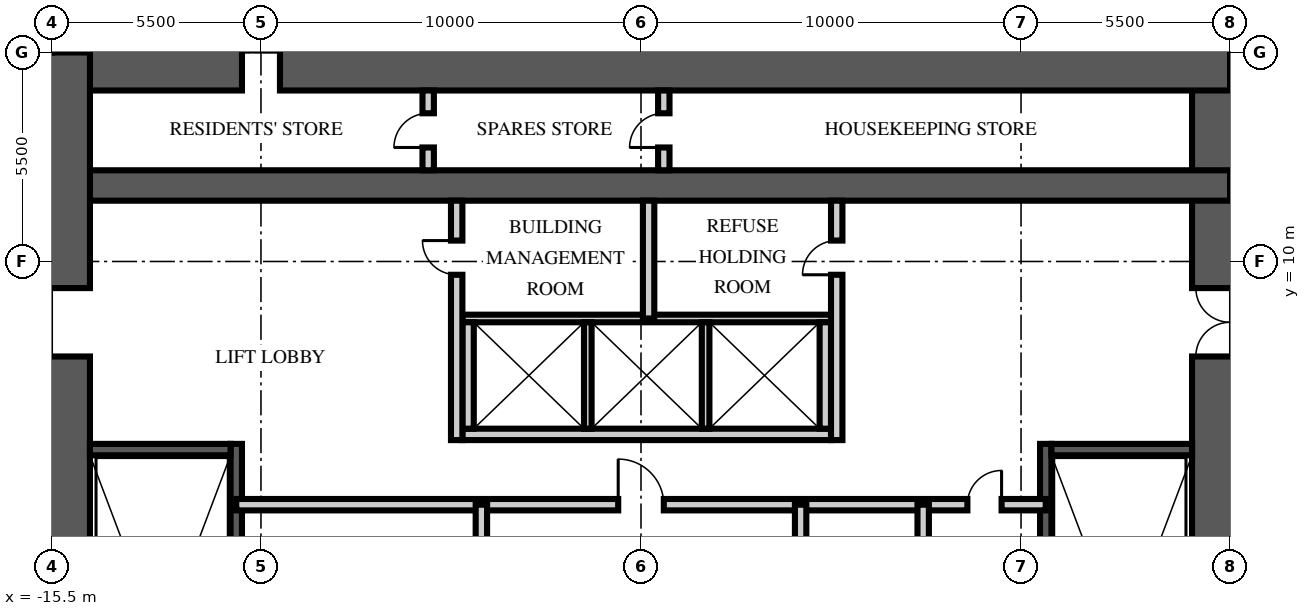
"""IFC4 building model, lengths in metres.
Left out: names, types, materials, properties, quantities, classifications, styles, units other than length and angle.
Written with IfcOpenShell. Run it as: python <this file> out.ifc"""

import sys

from ifc_helpers import new_model, si_unit, direction, frame, frame_2d, origin, place, context, subcontext, project, spatial, rectangle, extrude, element, fill, save


model = new_model("IFC4")
c1 = context("Model", 3, precision=1e-05, world=origin(), true_north=direction((0.0, 1.0)))
c2 = subcontext(c1, "Body", "Model", "MODEL_VIEW")
j1 = project(units=[si_unit("LENGTHUNIT", "METRE"), si_unit("PLANEANGLEUNIT", "RADIAN")], contexts=[c1])
p1 = place(None, origin())
s1 = spatial("IfcSite", under=j1, at=p1, CompositionType="ELEMENT")
p2 = place(p1, origin())
s2 = spatial("IfcBuilding", under=s1, at=p2, CompositionType="ELEMENT")
p3 = place(p2, frame((0.0, 0.0, 152.25)))
s3 = spatial("IfcBuildingStorey", under=s2, at=p3, CompositionType="ELEMENT", Elevation=152.25)
p4 = place(p3, frame((15.5, -15.5, -0.25), z_axis=(0.0, 0.0, 1.0), x_axis=(0.0, 1.0, 0.0)))
e1 = element("IfcWall", 1, at=p4, inside=s3, PredefinedType="SHEAR", context=c2, shape_type="SweptSolid", body=[
    extrude(rectangle(XDim=31.0, YDim=2.0, at=frame_2d((15.5, 0.0))), origin(), (0.0, 0.0, 1.0), 3.75),
])
p5 = place(p4, frame((6.5, 0.0, 0.25)))
e2 = element("IfcOpeningElement", 2, at=p5, cuts=e1, PredefinedType="OPENING", context=c2, shape_type="SweptSolid", body=[
    extrude(rectangle(XDim=1.2, YDim=2.1, at=frame_2d((0.6, 1.05))), frame((0.0, 1.01, 0.0), z_axis=(0.0, -1.0, 0.0), x_axis=(1.0, 0.0, 0.0)), (0.0, 0.0, 1.0), 2.02),
])
p6 = place(p4, frame((23.0, 0.0, 0.25)))
e3 = element("IfcOpeningElement", 3, at=p6, cuts=e1, PredefinedType="OPENING", context=c2, shape_type="SweptSolid", body=[
    extrude(rectangle(XDim=1.8, YDim=2.1, at=frame_2d((0.9, 1.05))), frame((0.0, 1.01, 0.0), z_axis=(0.0, -1.0, 0.0), x_axis=(1.0, 0.0, 0.0)), (0.0, 0.0, 1.0), 2.02),
])
p7 = place(p3, frame((-15.5, 15.5, -0.25), z_axis=(0.0, 0.0, 1.0), x_axis=(1.0, 0.0, 0.0)))
e4 = element("IfcWall", 4, at=p7, inside=s3, PredefinedType="SHEAR", context=c2, shape_type="SweptSolid", body=[
    extrude(rectangle(XDim=31.0, YDim=2.0, at=frame_2d((15.5, 0.0))), origin(), (0.0, 0.0, 1.0), 3.75),
])
p8 = place(p7, frame((5.0, 0.0, 0.25)))
e5 = element("IfcOpeningElement", 5, at=p8, cuts=e4, PredefinedType="OPENING", context=c2, shape_type="SweptSolid", body=[
    extrude(rectangle(XDim=1.0, YDim=2.1, at=frame_2d((0.5, 1.05))), frame((0.0, 1.01, 0.0), z_axis=(0.0, -1.0, 0.0), x_axis=(1.0, 0.0, 0.0)), (0.0, 0.0, 1.0), 2.02),
])
p9 = place(p3, frame((-15.5, 12.0, -0.25), z_axis=(0.0, 0.0, 1.0), x_axis=(1.0, 0.0, 0.0)))
e6 = element("IfcWall", 6, at=p9, inside=s3, PredefinedType="SHEAR", context=c2, shape_type="SweptSolid", body=[
    extrude(rectangle(XDim=31.0, YDim=0.8, at=frame_2d((15.5, 0.0))), origin(), (0.0, 0.0, 1.0), 3.75),
])
p10 = place(p3, frame((-15.5, -15.5, -0.25), z_axis=(0.0, 0.0, 1.0), x_axis=(0.0, 1.0, 0.0)))
e7 = element("IfcWall", 7, at=p10, inside=s3, PredefinedType="SHEAR", context=c2, shape_type="SweptSolid", body=[
    extrude(rectangle(XDim=31.0, YDim=2.0, at=frame_2d((15.5, 0.0))), origin(), (0.0, 0.0, 1.0), 3.75),
])
p11 = place(p10, frame((6.5, 0.0, 0.25)))
e8 = element("IfcOpeningElement", 8, at=p11, cuts=e7, PredefinedType="OPENING", context=c2, shape_type="SweptSolid", body=[
    extrude(rectangle(XDim=1.2, YDim=2.1, at=frame_2d((0.6, 1.05))), frame((0.0, 1.01, 0.0), z_axis=(0.0, -1.0, 0.0), x_axis=(1.0, 0.0, 0.0)), (0.0, 0.0, 1.0), 2.02),
])
p12 = place(p10, frame((23.0, 0.0, 0.25)))
e9 = element("IfcOpeningElement", 9, at=p12, cuts=e7, PredefinedType="OPENING", context=c2, shape_type="SweptSolid", body=[
    extrude(rectangle(XDim=1.8, YDim=2.1, at=frame_2d((0.9, 1.05))), frame((0.0, 1.01, 0.0), z_axis=(0.0, -1.0, 0.0), x_axis=(1.0, 0.0, 0.0)), (0.0, 0.0, 1.0), 2.02),
])
p13 = place(p3, frame((-10.65, -4.9, 0.0), z_axis=(0.0, 0.0, 1.0), x_axis=(0.0, 1.0, 0.0)))
e10 = element("IfcWall", 10, at=p13, inside=s3, PredefinedType="SOLIDWALL", context=c2, shape_type="SweptSolid", body=[
    extrude(rectangle(XDim=10.1, YDim=0.3, at=frame_2d((5.05, 0.0))), origin(), (0.0, 0.0, 1.0), 3.5),
])
p14 = place(p3, frame((-14.5, 5.05, 0.0), z_axis=(0.0, 0.0, 1.0), x_axis=(1.0, 0.0, 0.0)))
e11 = element("IfcWall", 11, at=p14, inside=s3, PredefinedType="SOLIDWALL", context=c2, shape_type="SweptSolid", body=[
    extrude(rectangle(XDim=3.7, YDim=0.3, at=frame_2d((1.85, 0.0))), origin(), (0.0, 0.0, 1.0), 3.5),
])
p15 = place(p3, frame((10.65, -4.9, 0.0), z_axis=(0.0, 0.0, 1.0), x_axis=(0.0, 1.0, 0.0)))
e12 = element("IfcWall", 12, at=p15, inside=s3, PredefinedType="SOLIDWALL", context=c2, shape_type="SweptSolid", body=[
    extrude(rectangle(XDim=10.1, YDim=0.3, at=frame_2d((5.05, 0.0))), origin(), (0.0, 0.0, 1.0), 3.5),
])
p16 = place(p3, frame((14.5, 5.05, 0.0), z_axis=(0.0, 0.0, 1.0), x_axis=(-1.0, 0.0, 0.0)))
e13 = element("IfcWall", 13, at=p16, inside=s3, PredefinedType="SOLIDWALL", context=c2, shape_type="SweptSolid", body=[
    extrude(rectangle(XDim=3.7, YDim=0.3, at=frame_2d((1.85, 0.0))), origin(), (0.0, 0.0, 1.0), 3.5),
])
p17 = place(p3, frame((-4.7, 5.45, 0.0), z_axis=(0.0, 0.0, 1.0), x_axis=(1.0, 0.0, 0.0)))
e14 = element("IfcWall", 14, at=p17, inside=s3, PredefinedType="PARTITIONING", context=c2, shape_type="SweptSolid", body=[
    extrude(rectangle(XDim=9.7, YDim=0.3, at=frame_2d((4.85, 0.0))), origin(), (0.0, 0.0, 1.0), 3.5),
])
p18 = place(p3, frame((-4.7, 8.5, 0.0), z_axis=(0.0, 0.0, 1.0), x_axis=(1.0, 0.0, 0.0)))
e15 = element("IfcWall", 15, at=p18, inside=s3, PredefinedType="PARTITIONING", context=c2, shape_type="SweptSolid", body=[
    extrude(rectangle(XDim=9.7, YDim=0.2, at=frame_2d((4.85, 0.0))), origin(), (0.0, 0.0, 1.0), 3.5),
])
for number, where, z_axis, x_axis in (
    (16, (-4.55, 5.6, 0.0), (0.0, 0.0, 1.0), (0.0, 1.0, 0.0)),
    (17, (4.85, 5.6, 0.0), (0.0, 0.0, 1.0), (0.0, 1.0, 0.0)),
):
    element("IfcWall", number, at=place(p3, frame(where, z_axis=z_axis, x_axis=x_axis)), inside=s3, PredefinedType="PARTITIONING", context=c2, shape_type="SweptSolid", body=[
        extrude(rectangle(XDim=2.8, YDim=0.3, at=frame_2d((1.4, 0.0))), origin(), (0.0, 0.0, 1.0), 3.5),
    ])
for number, where, z_axis, x_axis in (
    (18, (-1.4, 5.6, 0.0), (0.0, 0.0, 1.0), (0.0, 1.0, 0.0)),
    (19, (1.7, 5.6, 0.0), (0.0, 0.0, 1.0), (0.0, 1.0, 0.0)),
):
    element("IfcWall", number, at=place(p3, frame(where, z_axis=z_axis, x_axis=x_axis)), inside=s3, PredefinedType="PARTITIONING", context=c2, shape_type="SweptSolid", body=[
        extrude(rectangle(XDim=2.8, YDim=0.2, at=frame_2d((1.4, 0.0))), origin(), (0.0, 0.0, 1.0), 3.5),
    ])
p19 = place(p3, frame((-10.65, 3.6, 0.0), z_axis=(0.0, 0.0, 1.0), x_axis=(1.0, 0.0, 0.0)))
e20 = element("IfcWall", 20, at=p19, inside=s3, PredefinedType="PARTITIONING", context=c2, shape_type="SweptSolid", body=[
    extrude(rectangle(XDim=21.3, YDim=0.3, at=frame_2d((10.65, 0.0))), origin(), (0.0, 0.0, 1.0), 3.5),
])
p20 = place(p19, frame((10.05, 0.0, 0.0)))
e21 = element("IfcOpeningElement", 21, at=p20, cuts=e20, PredefinedType="OPENING", context=c2, shape_type="SweptSolid", body=[
    extrude(rectangle(XDim=1.2, YDim=2.1, at=frame_2d((0.6, 1.05))), frame((0.0, 0.16, 0.0), z_axis=(0.0, -1.0, 0.0), x_axis=(1.0, 0.0, 0.0)), (0.0, 0.0, 1.0), 0.32),
])
p21 = place(p19, frame((19.238, 0.0, 0.0)))
e22 = element("IfcOpeningElement", 22, at=p21, cuts=e20, PredefinedType="OPENING", context=c2, shape_type="SweptSolid", body=[
    extrude(rectangle(XDim=0.9, YDim=2.1, at=frame_2d((0.45, 1.05))), frame((0.0, 0.16, 0.0), z_axis=(0.0, -1.0, 0.0), x_axis=(1.0, 0.0, 0.0)), (0.0, 0.0, 1.0), 0.32),
])
p22 = place(p3, frame((-4.2, -6.65, 0.0), z_axis=(0.0, 0.0, 1.0), x_axis=(0.0, 1.0, 0.0)))
e23 = element("IfcWall", 23, at=p22, inside=s3, PredefinedType="PARTITIONING", context=c2, shape_type="SweptSolid", body=[
    extrude(rectangle(XDim=10.25, YDim=0.3, at=frame_2d((5.125, 0.0))), origin(), (0.0, 0.0, 1.0), 3.5),
])
p23 = place(p22, frame((0.787, 0.0, 0.0)))
e24 = element("IfcOpeningElement", 24, at=p23, cuts=e23, PredefinedType="OPENING", context=c2, shape_type="SweptSolid", body=[
    extrude(rectangle(XDim=0.9, YDim=2.1, at=frame_2d((0.45, 1.05))), frame((0.0, 0.16, 0.0), z_axis=(0.0, -1.0, 0.0), x_axis=(1.0, 0.0, 0.0)), (0.0, 0.0, 1.0), 0.32),
])
p24 = place(p22, frame((5.912, 0.0, 0.0)))
e25 = element("IfcOpeningElement", 25, at=p24, cuts=e23, PredefinedType="OPENING", context=c2, shape_type="SweptSolid", body=[
    extrude(rectangle(XDim=0.9, YDim=2.1, at=frame_2d((0.45, 1.05))), frame((0.0, 0.16, 0.0), z_axis=(0.0, -1.0, 0.0), x_axis=(1.0, 0.0, 0.0)), (0.0, 0.0, 1.0), 0.32),
])
p25 = place(p3, frame((4.2, -6.65, 0.0), z_axis=(0.0, 0.0, 1.0), x_axis=(0.0, 1.0, 0.0)))
e26 = element("IfcWall", 26, at=p25, inside=s3, PredefinedType="PARTITIONING", context=c2, shape_type="SweptSolid", body=[
    extrude(rectangle(XDim=10.25, YDim=0.3, at=frame_2d((5.125, 0.0))), origin(), (0.0, 0.0, 1.0), 3.5),
])
p26 = place(p25, frame((2.15, 0.0, 0.0)))
e27 = element("IfcOpeningElement", 27, at=p26, cuts=e26, PredefinedType="OPENING", context=c2, shape_type="SweptSolid", body=[
    extrude(rectangle(XDim=0.9, YDim=2.1, at=frame_2d((0.45, 1.05))), frame((0.0, 0.16, 0.0), z_axis=(0.0, -1.0, 0.0), x_axis=(1.0, 0.0, 0.0)), (0.0, 0.0, 1.0), 0.32),
])
p27 = place(p25, frame((7.275, 0.0, 0.0)))
e28 = element("IfcOpeningElement", 28, at=p27, cuts=e26, PredefinedType="OPENING", context=c2, shape_type="SweptSolid", body=[
    extrude(rectangle(XDim=0.9, YDim=2.1, at=frame_2d((0.45, 1.05))), frame((0.0, 0.16, 0.0), z_axis=(0.0, -1.0, 0.0), x_axis=(1.0, 0.0, 0.0)), (0.0, 0.0, 1.0), 0.32),
])
p28 = place(p3, frame((7.425, -1.45, 0.0), z_axis=(0.0, 0.0, 1.0), x_axis=(0.0, 1.0, 0.0)))
e29 = element("IfcWall", 29, at=p28, inside=s3, PredefinedType="PARTITIONING", context=c2, shape_type="SweptSolid", body=[
    extrude(rectangle(XDim=5.05, YDim=0.3, at=frame_2d((2.525, 0.0))), origin(), (0.0, 0.0, 1.0), 3.5),
])
p29 = place(p3, frame((-4.85, 5.3, 0.0), z_axis=(0.0, 0.0, 1.0), x_axis=(0.0, 1.0, 0.0)))
e30 = element("IfcWall", 30, at=p29, inside=s3, PredefinedType="PARTITIONING", context=c2, shape_type="SweptSolid", body=[
    extrude(rectangle(XDim=6.3, YDim=0.3, at=frame_2d((3.15, 0.0))), origin(), (0.0, 0.0, 1.0), 3.5),
])
p30 = place(p29, frame((4.35, 0.0, 0.0)))
e31 = element("IfcOpeningElement", 31, at=p30, cuts=e30, PredefinedType="OPENING", context=c2, shape_type="SweptSolid", body=[
    extrude(rectangle(XDim=0.9, YDim=2.1, at=frame_2d((0.45, 1.05))), frame((0.0, 0.16, 0.0), z_axis=(0.0, -1.0, 0.0), x_axis=(1.0, 0.0, 0.0)), (0.0, 0.0, 1.0), 0.32),
])
p31 = place(p3, frame((5.15, 5.3, 0.0), z_axis=(0.0, 0.0, 1.0), x_axis=(0.0, 1.0, 0.0)))
e32 = element("IfcWall", 32, at=p31, inside=s3, PredefinedType="PARTITIONING", context=c2, shape_type="SweptSolid", body=[
    extrude(rectangle(XDim=6.3, YDim=0.3, at=frame_2d((3.15, 0.0))), origin(), (0.0, 0.0, 1.0), 3.5),
])
p32 = place(p31, frame((4.35, 0.0, 0.0)))
e33 = element("IfcOpeningElement", 33, at=p32, cuts=e32, PredefinedType="OPENING", context=c2, shape_type="SweptSolid", body=[
    extrude(rectangle(XDim=0.9, YDim=2.1, at=frame_2d((0.45, 1.05))), frame((0.0, 0.16, 0.0), z_axis=(0.0, -1.0, 0.0), x_axis=(1.0, 0.0, 0.0)), (0.0, 0.0, 1.0), 0.32),
])
p33 = place(p3, frame((0.2, 8.5, 0.0), z_axis=(0.0, 0.0, 1.0), x_axis=(0.0, 1.0, 0.0)))
e34 = element("IfcWall", 34, at=p33, inside=s3, PredefinedType="PARTITIONING", context=c2, shape_type="SweptSolid", body=[
    extrude(rectangle(XDim=3.1, YDim=0.3, at=frame_2d((1.55, 0.0))), origin(), (0.0, 0.0, 1.0), 3.5),
])
p34 = place(p3, frame((-5.6, 12.4, 0.0), z_axis=(0.0, 0.0, 1.0), x_axis=(0.0, 1.0, 0.0)))
e35 = element("IfcWall", 35, at=p34, inside=s3, PredefinedType="PARTITIONING", context=c2, shape_type="SweptSolid", body=[
    extrude(rectangle(XDim=2.1, YDim=0.3, at=frame_2d((1.05, 0.0))), origin(), (0.0, 0.0, 1.0), 3.5),
])
p35 = place(p34, frame((0.6, 0.0, 0.0)))
e36 = element("IfcOpeningElement", 36, at=p35, cuts=e35, PredefinedType="OPENING", context=c2, shape_type="SweptSolid", body=[
    extrude(rectangle(XDim=0.9, YDim=2.1, at=frame_2d((0.45, 1.05))), frame((0.0, 0.16, 0.0), z_axis=(0.0, -1.0, 0.0), x_axis=(1.0, 0.0, 0.0)), (0.0, 0.0, 1.0), 0.32),
])
p36 = place(p3, frame((0.6, 12.4, 0.0), z_axis=(0.0, 0.0, 1.0), x_axis=(0.0, 1.0, 0.0)))
e37 = element("IfcWall", 37, at=p36, inside=s3, PredefinedType="PARTITIONING", context=c2, shape_type="SweptSolid", body=[
    extrude(rectangle(XDim=2.1, YDim=0.3, at=frame_2d((1.05, 0.0))), origin(), (0.0, 0.0, 1.0), 3.5),
])
p37 = place(p36, frame((0.6, 0.0, 0.0)))
e38 = element("IfcOpeningElement", 38, at=p37, cuts=e37, PredefinedType="OPENING", context=c2, shape_type="SweptSolid", body=[
    extrude(rectangle(XDim=0.9, YDim=2.1, at=frame_2d((0.45, 1.05))), frame((0.0, 0.16, 0.0), z_axis=(0.0, -1.0, 0.0), x_axis=(1.0, 0.0, 0.0)), (0.0, 0.0, 1.0), 0.32),
])
p38 = place(p12, origin())
e39 = element("IfcDoor", 39, at=p38, inside=s3, OperationType="DOUBLE_DOOR_SINGLE_SWING", PredefinedType="DOOR", context=c2, shape_type="SweptSolid", body=[
    extrude(rectangle(XDim=1.8, YDim=2.1, at=frame_2d((0.9, 1.05))), frame((0.0, 0.025, 0.0), z_axis=(0.0, -1.0, 0.0), x_axis=(1.0, 0.0, 0.0)), (0.0, 0.0, 1.0), 0.05),
])
fill(e9, e39)
p39 = place(p6, origin())
e40 = element("IfcDoor", 40, at=p39, inside=s3, OperationType="DOUBLE_DOOR_SINGLE_SWING", PredefinedType="DOOR", context=c2, shape_type="SweptSolid", body=[
    extrude(rectangle(XDim=1.8, YDim=2.1, at=frame_2d((0.9, 1.05))), frame((0.0, 0.025, 0.0), z_axis=(0.0, -1.0, 0.0), x_axis=(1.0, 0.0, 0.0)), (0.0, 0.0, 1.0), 0.05),
])
fill(e3, e40)
p40 = place(p20, origin())
e41 = element("IfcDoor", 41, at=p40, inside=s3, OperationType="SINGLE_SWING_LEFT", PredefinedType="DOOR", context=c2, shape_type="SweptSolid", body=[
    extrude(rectangle(XDim=1.2, YDim=2.1, at=frame_2d((0.6, 1.05))), frame((0.0, 0.025, 0.0), z_axis=(0.0, -1.0, 0.0), x_axis=(1.0, 0.0, 0.0)), (0.0, 0.0, 1.0), 0.05),
])
fill(e21, e41)
p41 = place(p21, origin())
e42 = element("IfcDoor", 42, at=p41, inside=s3, OperationType="SINGLE_SWING_RIGHT", PredefinedType="DOOR", context=c2, shape_type="SweptSolid", body=[
    extrude(rectangle(XDim=0.9, YDim=2.1, at=frame_2d((0.45, 1.05))), frame((0.0, 0.025, 0.0), z_axis=(0.0, -1.0, 0.0), x_axis=(1.0, 0.0, 0.0)), (0.0, 0.0, 1.0), 0.05),
])
fill(e22, e42)
p42 = place(p30, origin())
e43 = element("IfcDoor", 43, at=p42, inside=s3, OperationType="SINGLE_SWING_RIGHT", PredefinedType="DOOR", context=c2, shape_type="SweptSolid", body=[
    extrude(rectangle(XDim=0.9, YDim=2.1, at=frame_2d((0.45, 1.05))), frame((0.0, 0.025, 0.0), z_axis=(0.0, -1.0, 0.0), x_axis=(1.0, 0.0, 0.0)), (0.0, 0.0, 1.0), 0.05),
])
fill(e31, e43)
p43 = place(p32, origin())
e44 = element("IfcDoor", 44, at=p43, inside=s3, OperationType="SINGLE_SWING_LEFT", PredefinedType="DOOR", context=c2, shape_type="SweptSolid", body=[
    extrude(rectangle(XDim=0.9, YDim=2.1, at=frame_2d((0.45, 1.05))), frame((0.0, 0.025, 0.0), z_axis=(0.0, -1.0, 0.0), x_axis=(1.0, 0.0, 0.0)), (0.0, 0.0, 1.0), 0.05),
])
fill(e33, e44)
p44 = place(p35, origin())
e45 = element("IfcDoor", 45, at=p44, inside=s3, OperationType="SINGLE_SWING_LEFT", PredefinedType="DOOR", context=c2, shape_type="SweptSolid", body=[
    extrude(rectangle(XDim=0.9, YDim=2.1, at=frame_2d((0.45, 1.05))), frame((0.0, 0.025, 0.0), z_axis=(0.0, -1.0, 0.0), x_axis=(1.0, 0.0, 0.0)), (0.0, 0.0, 1.0), 0.05),
])
fill(e36, e45)
p45 = place(p37, origin())
e46 = element("IfcDoor", 46, at=p45, inside=s3, OperationType="SINGLE_SWING_LEFT", PredefinedType="DOOR", context=c2, shape_type="SweptSolid", body=[
    extrude(rectangle(XDim=0.9, YDim=2.1, at=frame_2d((0.45, 1.05))), frame((0.0, 0.025, 0.0), z_axis=(0.0, -1.0, 0.0), x_axis=(1.0, 0.0, 0.0)), (0.0, 0.0, 1.0), 0.05),
])
fill(e38, e46)
p46 = place(p8, origin())
e47 = element("IfcDoor", 47, at=p46, inside=s3, OperationType="SINGLE_SWING_RIGHT", PredefinedType="DOOR", context=c2, shape_type="SweptSolid", body=[
    extrude(rectangle(XDim=1.0, YDim=2.1, at=frame_2d((0.5, 1.05))), frame((0.0, 0.025, 0.0), z_axis=(0.0, -1.0, 0.0), x_axis=(1.0, 0.0, 0.0)), (0.0, 0.0, 1.0), 0.05),
])
fill(e5, e47)
save(model, sys.argv[1])
